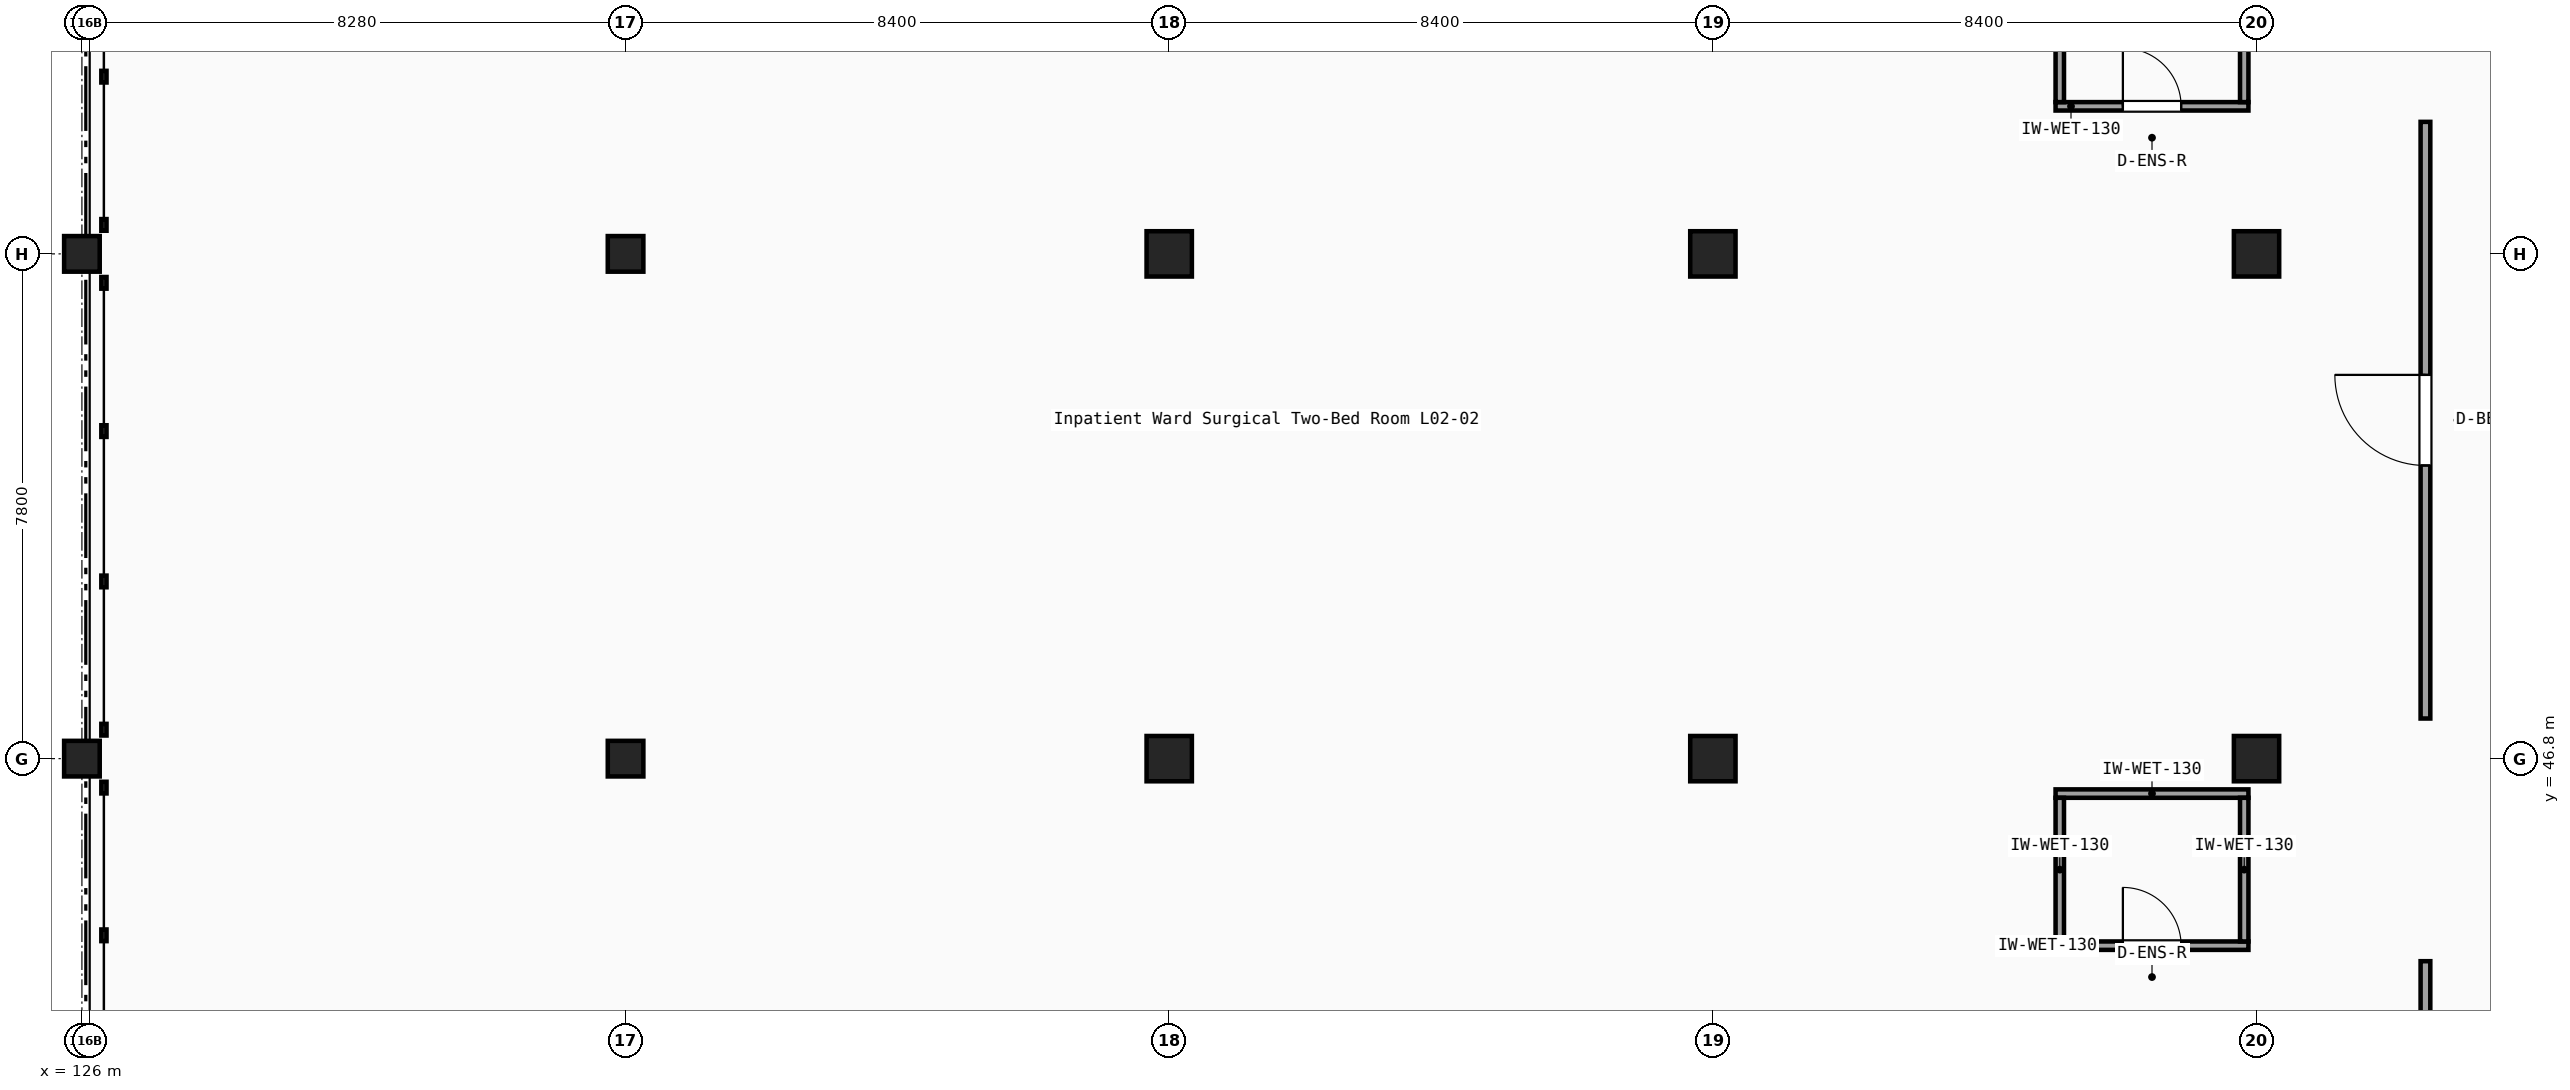
"""IFC4 building model, lengths in metres.
Left out: names, types, materials, properties, quantities, classifications, styles, units other than length and angle.
Written with IfcOpenShell. Run it as: python <this file> out.ifc"""

import sys

from ifc_helpers import new_model, si_unit, direction, frame, frame_2d, origin, origin_2d, place, context, subcontext, project, spatial, rectangle, i_section, extrude, element, fill, save


model = new_model("IFC4")
c1 = context("Model", 3, precision=1e-05, world=origin(), true_north=direction((0.0, 1.0)))
c2 = subcontext(c1, "Body", "Model", "MODEL_VIEW")
j1 = project(units=[si_unit("LENGTHUNIT", "METRE"), si_unit("PLANEANGLEUNIT", "RADIAN")], contexts=[c1])
p1 = place(None, origin())
s1 = spatial("IfcSite", under=j1, at=p1, CompositionType="ELEMENT")
p2 = place(p1, origin())
s2 = spatial("IfcBuilding", under=s1, at=p2, CompositionType="ELEMENT")
p3 = place(p2, frame((0.0, 0.0, 10.2)))
s3 = spatial("IfcBuildingStorey", under=s2, at=p3, CompositionType="ELEMENT", Elevation=10.2)
for number, where, z_axis, x_axis in (
    (1, (126.0, 46.8, 0.0), (0.0, 0.0, 1.0), (1.0, 0.0, 0.0)),
    (2, (126.0, 54.6, 0.0), (0.0, 0.0, 1.0), (1.0, 0.0, 0.0)),
    (3, (134.4, 46.8, 0.0), (0.0, 0.0, 1.0), (1.0, 0.0, 0.0)),
    (4, (134.4, 54.6, 0.0), (0.0, 0.0, 1.0), (1.0, 0.0, 0.0)),
):
    element("IfcColumn", number, at=place(p3, frame(where, z_axis=z_axis, x_axis=x_axis)), inside=s3, PredefinedType="COLUMN", context=c2, shape_type="SweptSolid", body=[
        extrude(i_section(OverallWidth=0.3, OverallDepth=0.55, WebThickness=0.015, FlangeThickness=0.029, FilletRadius=0.027, at=origin_2d()), origin(), (0.0, 0.0, 1.0), 4.65),
    ])
for number, where, z_axis, x_axis in (
    (5, (142.8, 46.8, 0.0), (0.0, 0.0, 1.0), (1.0, 0.0, 0.0)),
    (6, (142.8, 54.6, 0.0), (0.0, 0.0, 1.0), (1.0, 0.0, 0.0)),
    (7, (151.2, 46.8, 0.0), (0.0, 0.0, 1.0), (1.0, 0.0, 0.0)),
    (8, (151.2, 54.6, 0.0), (0.0, 0.0, 1.0), (1.0, 0.0, 0.0)),
    (9, (159.6, 46.8, 0.0), (0.0, 0.0, 1.0), (1.0, 0.0, 0.0)),
    (10, (159.6, 54.6, 0.0), (0.0, 0.0, 1.0), (1.0, 0.0, 0.0)),
):
    element("IfcColumn", number, at=place(p3, frame(where, z_axis=z_axis, x_axis=x_axis)), inside=s3, PredefinedType="COLUMN", context=c2, shape_type="SweptSolid", body=[
        extrude(rectangle(XDim=0.7, YDim=0.7, at=origin_2d()), origin(), (0.0, 0.0, 1.0), 4.65),
    ])
p4 = place(p3, frame((162.21, 39.62, 0.0), z_axis=(0.0, 0.0, 1.0), x_axis=(0.0, 1.0, 0.0)))
e11 = element("IfcWall", 11, at=p4, inside=s3, PredefinedType="PARTITIONING", context=c2, shape_type="SweptSolid", body=[
    extrude(rectangle(XDim=4.05, YDim=0.15, at=frame_2d((2.025, 0.0))), origin(), (0.0, 0.0, 1.0), 4.37),
])
p5 = place(p4, frame((1.325, 0.0, 0.0)))
e12 = element("IfcOpeningElement", 12, at=p5, cuts=e11, PredefinedType="OPENING", context=c2, shape_type="SweptSolid", body=[
    extrude(rectangle(XDim=1.4, YDim=2.2, at=frame_2d((0.7, 1.1))), frame((0.0, 0.085, 0.0), z_axis=(0.0, -1.0, 0.0), x_axis=(1.0, 0.0, 0.0)), (0.0, 0.0, 1.0), 0.17),
])
p6 = place(p3, frame((156.495, 43.91, 0.0), z_axis=(0.0, 0.0, 1.0), x_axis=(1.0, 0.0, 0.0)))
e13 = element("IfcWall", 13, at=p6, inside=s3, PredefinedType="PARTITIONING", context=c2, shape_type="SweptSolid", body=[
    extrude(rectangle(XDim=2.98, YDim=0.13, at=frame_2d((1.49, 0.0))), origin(), (0.0, 0.0, 1.0), 4.08),
])
p7 = place(p6, frame((1.04, 0.0, 0.0)))
e14 = element("IfcOpeningElement", 14, at=p7, cuts=e13, PredefinedType="OPENING", context=c2, shape_type="SweptSolid", body=[
    extrude(rectangle(XDim=0.9, YDim=2.1, at=frame_2d((0.45, 1.05))), frame((0.0, 0.075, 0.0), z_axis=(0.0, -1.0, 0.0), x_axis=(1.0, 0.0, 0.0)), (0.0, 0.0, 1.0), 0.15),
])
p8 = place(p3, frame((156.495, 46.26, 0.0), z_axis=(0.0, 0.0, 1.0), x_axis=(1.0, 0.0, 0.0)))
e15 = element("IfcWall", 15, at=p8, inside=s3, PredefinedType="PARTITIONING", context=c2, shape_type="SweptSolid", body=[
    extrude(rectangle(XDim=2.98, YDim=0.13, at=frame_2d((1.49, 0.0))), origin(), (0.0, 0.0, 1.0), 4.08),
])
p9 = place(p3, frame((156.56, 43.975, 0.0), z_axis=(0.0, 0.0, 1.0), x_axis=(0.0, 1.0, 0.0)))
e16 = element("IfcWall", 16, at=p9, inside=s3, PredefinedType="PARTITIONING", context=c2, shape_type="SweptSolid", body=[
    extrude(rectangle(XDim=2.22, YDim=0.13, at=frame_2d((1.11, 0.0))), origin(), (0.0, 0.0, 1.0), 4.37),
])
p10 = place(p3, frame((159.41, 43.975, 0.0), z_axis=(0.0, 0.0, 1.0), x_axis=(0.0, 1.0, 0.0)))
e17 = element("IfcWall", 17, at=p10, inside=s3, PredefinedType="PARTITIONING", context=c2, shape_type="SweptSolid", body=[
    extrude(rectangle(XDim=2.22, YDim=0.13, at=frame_2d((1.11, 0.0))), origin(), (0.0, 0.0, 1.0), 4.08),
])
p11 = place(p3, frame((162.21, 47.42, 0.0), z_axis=(0.0, 0.0, 1.0), x_axis=(0.0, 1.0, 0.0)))
e18 = element("IfcWall", 18, at=p11, inside=s3, PredefinedType="PARTITIONING", context=c2, shape_type="SweptSolid", body=[
    extrude(rectangle(XDim=9.22, YDim=0.15, at=frame_2d((4.61, 0.0))), origin(), (0.0, 0.0, 1.0), 3.95),
])
p12 = place(p11, frame((3.91, 0.0, 0.0)))
e19 = element("IfcOpeningElement", 19, at=p12, cuts=e18, PredefinedType="OPENING", context=c2, shape_type="SweptSolid", body=[
    extrude(rectangle(XDim=1.4, YDim=2.2, at=frame_2d((0.7, 1.1))), frame((0.0, 0.085, 0.0), z_axis=(0.0, -1.0, 0.0), x_axis=(1.0, 0.0, 0.0)), (0.0, 0.0, 1.0), 0.17),
])
p13 = place(p3, frame((156.495, 56.88, 0.0), z_axis=(0.0, 0.0, 1.0), x_axis=(1.0, 0.0, 0.0)))
e20 = element("IfcWall", 20, at=p13, inside=s3, PredefinedType="PARTITIONING", context=c2, shape_type="SweptSolid", body=[
    extrude(rectangle(XDim=2.98, YDim=0.13, at=frame_2d((1.49, 0.0))), origin(), (0.0, 0.0, 1.0), 4.08),
])
p14 = place(p13, frame((1.04, 0.0, 0.0)))
e21 = element("IfcOpeningElement", 21, at=p14, cuts=e20, PredefinedType="OPENING", context=c2, shape_type="SweptSolid", body=[
    extrude(rectangle(XDim=0.9, YDim=2.1, at=frame_2d((0.45, 1.05))), frame((0.0, 0.075, 0.0), z_axis=(0.0, -1.0, 0.0), x_axis=(1.0, 0.0, 0.0)), (0.0, 0.0, 1.0), 0.15),
])
p15 = place(p3, frame((156.56, 56.945, 0.0), z_axis=(0.0, 0.0, 1.0), x_axis=(0.0, 1.0, 0.0)))
e22 = element("IfcWall", 22, at=p15, inside=s3, PredefinedType="PARTITIONING", context=c2, shape_type="SweptSolid", body=[
    extrude(rectangle(XDim=2.22, YDim=0.13, at=frame_2d((1.11, 0.0))), origin(), (0.0, 0.0, 1.0), 4.37),
])
p16 = place(p3, frame((159.41, 56.945, 0.0), z_axis=(0.0, 0.0, 1.0), x_axis=(0.0, 1.0, 0.0)))
e23 = element("IfcWall", 23, at=p16, inside=s3, PredefinedType="PARTITIONING", context=c2, shape_type="SweptSolid", body=[
    extrude(rectangle(XDim=2.22, YDim=0.13, at=frame_2d((1.11, 0.0))), origin(), (0.0, 0.0, 1.0), 4.08),
])
p17 = place(p7, origin())
e24 = element("IfcDoor", 24, at=p17, inside=s3, OperationType="SINGLE_SWING_LEFT", PredefinedType="DOOR", context=c2, shape_type="SweptSolid", body=[
    extrude(rectangle(XDim=0.9, YDim=2.1, at=frame_2d((0.45, 1.05))), frame((0.0, 0.025, 0.0), z_axis=(0.0, -1.0, 0.0), x_axis=(1.0, 0.0, 0.0)), (0.0, 0.0, 1.0), 0.05),
])
fill(e14, e24)
p18 = place(p12, origin())
e25 = element("IfcDoor", 25, at=p18, inside=s3, OperationType="SINGLE_SWING_RIGHT", PredefinedType="DOOR", context=c2, shape_type="SweptSolid", body=[
    extrude(rectangle(XDim=1.4, YDim=2.2, at=frame_2d((0.7, 1.1))), frame((0.0, 0.025, 0.0), z_axis=(0.0, -1.0, 0.0), x_axis=(1.0, 0.0, 0.0)), (0.0, 0.0, 1.0), 0.05),
])
fill(e19, e25)
p19 = place(p14, origin())
e26 = element("IfcDoor", 26, at=p19, inside=s3, OperationType="SINGLE_SWING_LEFT", PredefinedType="DOOR", context=c2, shape_type="SweptSolid", body=[
    extrude(rectangle(XDim=0.9, YDim=2.1, at=frame_2d((0.45, 1.05))), frame((0.0, 0.025, 0.0), z_axis=(0.0, -1.0, 0.0), x_axis=(1.0, 0.0, 0.0)), (0.0, 0.0, 1.0), 0.05),
])
fill(e21, e26)
save(model, sys.argv[1])
